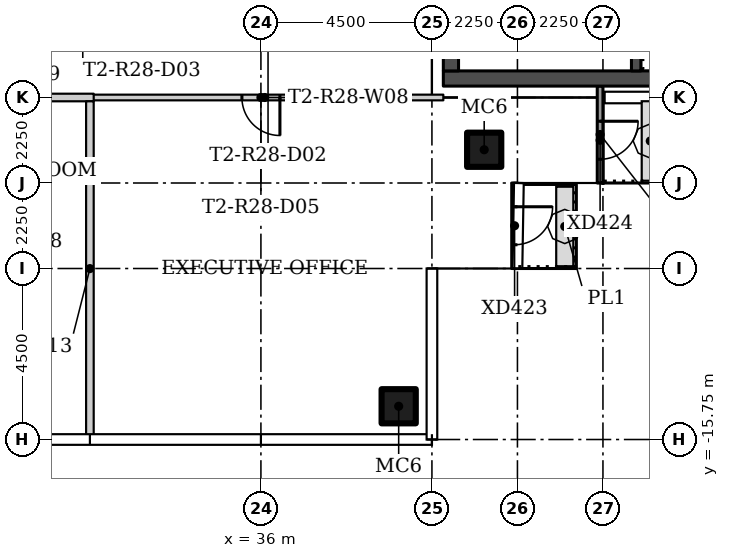
"""IFC4 building model, lengths in metres.
Left out: names, types, materials, properties, quantities, classifications, styles, units other than length and angle.
Written with IfcOpenShell. Run it as: python <this file> out.ifc"""

import sys

from ifc_helpers import new_model, si_unit, direction, frame, frame_2d, origin, origin_2d, place, context, subcontext, project, spatial, rectangle, hollow_rectangle, extrude, element, fill, save


model = new_model("IFC4")
c1 = context("Model", 3, precision=1e-05, world=origin(), true_north=direction((0.0, 1.0)))
c2 = subcontext(c1, "Body", "Model", "MODEL_VIEW")
j1 = project(units=[si_unit("LENGTHUNIT", "METRE"), si_unit("PLANEANGLEUNIT", "RADIAN")], contexts=[c1])
p1 = place(None, origin())
s1 = spatial("IfcSite", under=j1, at=p1, CompositionType="ELEMENT")
p2 = place(p1, origin())
s2 = spatial("IfcBuilding", under=s1, at=p2, CompositionType="ELEMENT")
p3 = place(p2, frame((0.0, 0.0, 257.7)))
s3 = spatial("IfcBuildingStorey", under=s2, at=p3, CompositionType="ELEMENT", Elevation=257.7)
for number, where in (
    (1, (41.875, -8.125, 0.0)),
    (2, (39.625, -14.875, 0.0)),
):
    element("IfcColumn", number, at=place(p3, frame(where)), inside=s3, PredefinedType="COLUMN", context=c2, shape_type="SweptSolid", body=[
        extrude(hollow_rectangle(XDim=0.9, YDim=0.9, WallThickness=0.036, at=origin_2d()), origin(), (0.0, 0.0, 1.0), 3.55),
    ])
p4 = place(p3, frame((40.8, -6.75, 0.0), z_axis=(0.0, 0.0, 1.0), x_axis=(-1.0, 0.0, 0.0)))
e3 = element("IfcWall", 3, at=p4, inside=s3, PredefinedType="PARTITIONING", context=c2, shape_type="SweptSolid", body=[
    extrude(rectangle(XDim=9.4, YDim=0.15, at=frame_2d((4.7, 0.0))), origin(), (0.0, 0.0, 1.0), 3.55),
])
p5 = place(p4, frame((4.3, 0.0, 0.0)))
e4 = element("IfcOpeningElement", 4, at=p5, cuts=e3, PredefinedType="OPENING", context=c2, shape_type="SweptSolid", body=[
    extrude(rectangle(XDim=1.0, YDim=2.4, at=frame_2d((0.5, 1.2))), frame((0.0, 0.085, 0.0), z_axis=(0.0, -1.0, 0.0), x_axis=(1.0, 0.0, 0.0)), (0.0, 0.0, 1.0), 0.17),
])
p6 = place(p3, frame((31.6, -6.75, 0.0), z_axis=(0.0, 0.0, 1.0), x_axis=(-1.0, 0.0, 0.0)))
e5 = element("IfcWall", 5, at=p6, inside=s3, PredefinedType="PARTITIONING", context=c2, shape_type="SweptSolid", body=[
    extrude(rectangle(XDim=4.9, YDim=0.2, at=frame_2d((2.45, 0.0))), origin(), (0.0, 0.0, 1.0), 3.55),
])
p7 = place(p6, frame((1.6, 0.0, 0.0)))
e6 = element("IfcOpeningElement", 6, at=p7, cuts=e5, PredefinedType="OPENING", context=c2, shape_type="SweptSolid", body=[
    extrude(rectangle(XDim=1.5, YDim=2.4, at=frame_2d((0.75, 1.2))), frame((0.0, 0.11, 0.0), z_axis=(0.0, -1.0, 0.0), x_axis=(1.0, 0.0, 0.0)), (0.0, 0.0, 1.0), 0.22),
])
p8 = place(p3, frame((31.5, -6.85, 0.0), z_axis=(0.0, 0.0, 1.0), x_axis=(0.0, -1.0, 0.0)))
e7 = element("IfcWall", 7, at=p8, inside=s3, PredefinedType="PARTITIONING", context=c2, shape_type="SweptSolid", body=[
    extrude(rectangle(XDim=8.805, YDim=0.2, at=frame_2d((4.402, 0.0))), origin(), (0.0, 0.0, 1.0), 3.55),
])
p9 = place(p3, frame((42.675, -9.0, 0.0), z_axis=(0.0, 0.0, 1.0), x_axis=(0.0, -1.0, 0.0)))
e8 = element("IfcWall", 8, at=p9, inside=s3, PredefinedType="SOLIDWALL", context=c2, shape_type="SweptSolid", body=[
    extrude(rectangle(XDim=2.25, YDim=0.15, at=frame_2d((1.125, 0.0))), origin(), (0.0, 0.0, 1.0), 3.45),
])
p10 = place(p9, frame((0.625, 0.0, 0.0)))
e9 = element("IfcOpeningElement", 9, at=p10, cuts=e8, PredefinedType="OPENING", context=c2, shape_type="SweptSolid", body=[
    extrude(rectangle(XDim=1.0, YDim=2.4, at=frame_2d((0.5, 1.2))), frame((0.0, 0.085, 0.0), z_axis=(0.0, -1.0, 0.0), x_axis=(1.0, 0.0, 0.0)), (0.0, 0.0, 1.0), 0.17),
])
p11 = place(p3, frame((44.925, -6.448, 0.0), z_axis=(0.0, 0.0, 1.0), x_axis=(0.0, -1.0, 0.0)))
e10 = element("IfcWall", 10, at=p11, inside=s3, PredefinedType="SOLIDWALL", context=c2, shape_type="SweptSolid", body=[
    extrude(rectangle(XDim=2.552, YDim=0.15, at=frame_2d((1.276, 0.0))), origin(), (0.0, 0.0, 1.0), 3.45),
])
p12 = place(p11, frame((0.927, 0.0, 0.0)))
e11 = element("IfcOpeningElement", 11, at=p12, cuts=e10, PredefinedType="OPENING", context=c2, shape_type="SweptSolid", body=[
    extrude(rectangle(XDim=1.0, YDim=2.4, at=frame_2d((0.5, 1.2))), frame((0.0, 0.085, 0.0), z_axis=(0.0, -1.0, 0.0), x_axis=(1.0, 0.0, 0.0)), (0.0, 0.0, 1.0), 0.17),
])
p13 = place(p3, frame((53.7, -6.25, 0.0), z_axis=(0.0, 0.0, 1.0), x_axis=(-1.0, 0.0, 0.0)))
e12 = element("IfcWall", 12, at=p13, inside=s3, PredefinedType="SHEAR", context=c2, shape_type="SweptSolid", body=[
    extrude(rectangle(XDim=12.9, YDim=0.4, at=frame_2d((6.45, 0.0))), origin(), (0.0, 0.0, 1.0), 3.55),
])
p14 = place(p3, frame((41.0, -6.05, 0.0), z_axis=(0.0, 0.0, 1.0), x_axis=(0.0, 1.0, 0.0)))
e13 = element("IfcWall", 13, at=p14, inside=s3, PredefinedType="SHEAR", context=c2, shape_type="SweptSolid", body=[
    extrude(rectangle(XDim=12.1, YDim=0.4, at=frame_2d((6.05, 0.0))), origin(), (0.0, 0.0, 1.0), 3.55),
])
p15 = place(p14, frame((0.8, 0.0, 0.0)))
e14 = element("IfcOpeningElement", 14, at=p15, cuts=e13, PredefinedType="OPENING", context=c2, shape_type="SweptSolid", body=[
    extrude(rectangle(XDim=1.2, YDim=2.1, at=frame_2d((0.6, 1.05))), frame((0.0, 0.21, 0.0), z_axis=(0.0, -1.0, 0.0), x_axis=(1.0, 0.0, 0.0)), (0.0, 0.0, 1.0), 0.42),
])
p16 = place(p14, frame((6.4, 0.0, 0.0)))
e15 = element("IfcOpeningElement", 15, at=p16, cuts=e13, PredefinedType="OPENING", context=c2, shape_type="SweptSolid", body=[
    extrude(rectangle(XDim=1.8, YDim=2.4, at=frame_2d((0.9, 1.2))), frame((0.0, 0.21, 0.0), z_axis=(0.0, -1.0, 0.0), x_axis=(1.0, 0.0, 0.0)), (0.0, 0.0, 1.0), 0.42),
])
p17 = place(p3, frame((45.875, -6.05, 0.0), z_axis=(0.0, 0.0, 1.0), x_axis=(0.0, 1.0, 0.0)))
e16 = element("IfcWall", 16, at=p17, inside=s3, PredefinedType="SHEAR", context=c2, shape_type="SweptSolid", body=[
    extrude(rectangle(XDim=2.55, YDim=0.25, at=frame_2d((1.275, 0.0))), origin(), (0.0, 0.0, 1.0), 3.55),
])
p18 = place(p5, origin())
e17 = element("IfcDoor", 17, at=p18, inside=s3, OperationType="SINGLE_SWING_RIGHT", PredefinedType="DOOR", context=c2, shape_type="SweptSolid", body=[
    extrude(rectangle(XDim=1.0, YDim=2.4, at=frame_2d((0.5, 1.2))), frame((0.0, 0.025, 0.0), z_axis=(0.0, -1.0, 0.0), x_axis=(1.0, 0.0, 0.0)), (0.0, 0.0, 1.0), 0.05),
])
fill(e4, e17)
p19 = place(p10, origin())
e18 = element("IfcDoor", 18, at=p19, inside=s3, OperationType="SINGLE_SWING_LEFT", PredefinedType="DOOR", context=c2, shape_type="SweptSolid", body=[
    extrude(rectangle(XDim=1.0, YDim=2.4, at=frame_2d((0.5, 1.2))), frame((0.0, 0.025, 0.0), z_axis=(0.0, -1.0, 0.0), x_axis=(1.0, 0.0, 0.0)), (0.0, 0.0, 1.0), 0.05),
])
fill(e9, e18)
p20 = place(p12, origin())
e19 = element("IfcDoor", 19, at=p20, inside=s3, OperationType="SINGLE_SWING_RIGHT", PredefinedType="DOOR", context=c2, shape_type="SweptSolid", body=[
    extrude(rectangle(XDim=1.0, YDim=2.4, at=frame_2d((0.5, 1.2))), frame((0.0, 0.025, 0.0), z_axis=(0.0, -1.0, 0.0), x_axis=(1.0, 0.0, 0.0)), (0.0, 0.0, 1.0), 0.05),
])
fill(e11, e19)
save(model, sys.argv[1])
